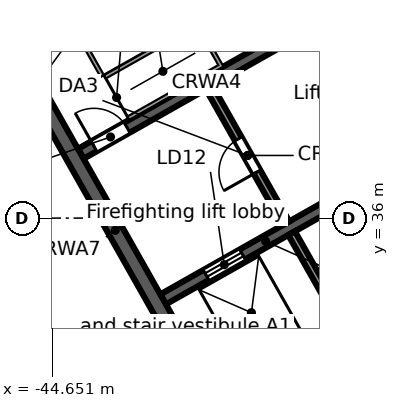
"""IFC4 building model, lengths in metres.
Left out: names, types, materials, properties, quantities, classifications, styles, units other than length and angle.
Written with IfcOpenShell. Run it as: python <this file> out.ifc"""

import sys

from ifc_helpers import new_model, si_unit, direction, frame, frame_2d, origin, place, context, subcontext, project, spatial, rectangle, extrude, element, fill, save


model = new_model("IFC4")
c1 = context("Model", 3, precision=1e-05, world=origin(), true_north=direction((0.0, 1.0)))
c2 = subcontext(c1, "Body", "Model", "MODEL_VIEW")
j1 = project(units=[si_unit("LENGTHUNIT", "METRE"), si_unit("PLANEANGLEUNIT", "RADIAN")], contexts=[c1])
p1 = place(None, origin())
s1 = spatial("IfcSite", under=j1, at=p1, CompositionType="ELEMENT")
p2 = place(p1, origin())
s2 = spatial("IfcBuilding", under=s1, at=p2, CompositionType="ELEMENT")
p3 = place(p2, frame((0.0, 0.0, 262.7)))
s3 = spatial("IfcBuildingStorey", under=s2, at=p3, CompositionType="ELEMENT", Elevation=262.7)
p4 = place(p3, frame((-58.732, 38.771, 0.0), z_axis=(0.0, 0.0, 1.0), x_axis=(0.870355615581, 0.492423702137, 0.0)))
e1 = element("IfcWall", 1, at=p4, inside=s3, PredefinedType="STANDARD", context=c2, shape_type="SweptSolid", body=[
    extrude(rectangle(XDim=64.052, YDim=0.25, at=frame_2d((32.026, 0.0))), origin(), (0.0, 0.0, 1.0), 3.52),
])
p5 = place(p4, frame((61.259, 0.0, 0.8)))
e2 = element("IfcOpeningElement", 2, at=p5, cuts=e1, PredefinedType="OPENING", context=c2, shape_type="SweptSolid", body=[
    extrude(rectangle(XDim=2.4, YDim=2.2, at=frame_2d((1.2, 1.1))), frame((0.0, 0.135, 0.0), z_axis=(0.0, -1.0, 0.0), x_axis=(1.0, 0.0, 0.0)), (0.0, 0.0, 1.0), 0.27),
])
p6 = place(p4, frame((58.216, 0.0, 0.8)))
e3 = element("IfcOpeningElement", 3, at=p6, cuts=e1, PredefinedType="OPENING", context=c2, shape_type="SweptSolid", body=[
    extrude(rectangle(XDim=2.4, YDim=2.2, at=frame_2d((1.2, 1.1))), frame((0.0, 0.135, 0.0), z_axis=(0.0, -1.0, 0.0), x_axis=(1.0, 0.0, 0.0)), (0.0, 0.0, 1.0), 0.27),
])
p7 = place(p4, frame((55.173, 0.0, 0.8)))
e4 = element("IfcOpeningElement", 4, at=p7, cuts=e1, PredefinedType="OPENING", context=c2, shape_type="SweptSolid", body=[
    extrude(rectangle(XDim=2.4, YDim=2.2, at=frame_2d((1.2, 1.1))), frame((0.0, 0.135, 0.0), z_axis=(0.0, -1.0, 0.0), x_axis=(1.0, 0.0, 0.0)), (0.0, 0.0, 1.0), 0.27),
])
p8 = place(p4, frame((52.129, 0.0, 0.8)))
e5 = element("IfcOpeningElement", 5, at=p8, cuts=e1, PredefinedType="OPENING", context=c2, shape_type="SweptSolid", body=[
    extrude(rectangle(XDim=2.4, YDim=2.2, at=frame_2d((1.2, 1.1))), frame((0.0, 0.135, 0.0), z_axis=(0.0, -1.0, 0.0), x_axis=(1.0, 0.0, 0.0)), (0.0, 0.0, 1.0), 0.27),
])
p9 = place(p4, frame((49.086, 0.0, 0.8)))
e6 = element("IfcOpeningElement", 6, at=p9, cuts=e1, PredefinedType="OPENING", context=c2, shape_type="SweptSolid", body=[
    extrude(rectangle(XDim=2.4, YDim=2.2, at=frame_2d((1.2, 1.1))), frame((0.0, 0.135, 0.0), z_axis=(0.0, -1.0, 0.0), x_axis=(1.0, 0.0, 0.0)), (0.0, 0.0, 1.0), 0.27),
])
p10 = place(p4, frame((46.043, 0.0, 0.8)))
e7 = element("IfcOpeningElement", 7, at=p10, cuts=e1, PredefinedType="OPENING", context=c2, shape_type="SweptSolid", body=[
    extrude(rectangle(XDim=2.4, YDim=2.2, at=frame_2d((1.2, 1.1))), frame((0.0, 0.135, 0.0), z_axis=(0.0, -1.0, 0.0), x_axis=(1.0, 0.0, 0.0)), (0.0, 0.0, 1.0), 0.27),
])
p11 = place(p4, frame((43.0, 0.0, 0.8)))
e8 = element("IfcOpeningElement", 8, at=p11, cuts=e1, PredefinedType="OPENING", context=c2, shape_type="SweptSolid", body=[
    extrude(rectangle(XDim=2.4, YDim=2.2, at=frame_2d((1.2, 1.1))), frame((0.0, 0.135, 0.0), z_axis=(0.0, -1.0, 0.0), x_axis=(1.0, 0.0, 0.0)), (0.0, 0.0, 1.0), 0.27),
])
p12 = place(p4, frame((39.956, 0.0, 0.8)))
e9 = element("IfcOpeningElement", 9, at=p12, cuts=e1, PredefinedType="OPENING", context=c2, shape_type="SweptSolid", body=[
    extrude(rectangle(XDim=2.4, YDim=2.2, at=frame_2d((1.2, 1.1))), frame((0.0, 0.135, 0.0), z_axis=(0.0, -1.0, 0.0), x_axis=(1.0, 0.0, 0.0)), (0.0, 0.0, 1.0), 0.27),
])
p13 = place(p4, frame((36.913, 0.0, 0.8)))
e10 = element("IfcOpeningElement", 10, at=p13, cuts=e1, PredefinedType="OPENING", context=c2, shape_type="SweptSolid", body=[
    extrude(rectangle(XDim=2.4, YDim=2.2, at=frame_2d((1.2, 1.1))), frame((0.0, 0.135, 0.0), z_axis=(0.0, -1.0, 0.0), x_axis=(1.0, 0.0, 0.0)), (0.0, 0.0, 1.0), 0.27),
])
p14 = place(p4, frame((33.87, 0.0, 0.8)))
e11 = element("IfcOpeningElement", 11, at=p14, cuts=e1, PredefinedType="OPENING", context=c2, shape_type="SweptSolid", body=[
    extrude(rectangle(XDim=2.4, YDim=2.2, at=frame_2d((1.2, 1.1))), frame((0.0, 0.135, 0.0), z_axis=(0.0, -1.0, 0.0), x_axis=(1.0, 0.0, 0.0)), (0.0, 0.0, 1.0), 0.27),
])
p15 = place(p4, frame((30.826, 0.0, 0.8)))
e12 = element("IfcOpeningElement", 12, at=p15, cuts=e1, PredefinedType="OPENING", context=c2, shape_type="SweptSolid", body=[
    extrude(rectangle(XDim=2.4, YDim=2.2, at=frame_2d((1.2, 1.1))), frame((0.0, 0.135, 0.0), z_axis=(0.0, -1.0, 0.0), x_axis=(1.0, 0.0, 0.0)), (0.0, 0.0, 1.0), 0.27),
])
p16 = place(p4, frame((27.783, 0.0, 0.8)))
e13 = element("IfcOpeningElement", 13, at=p16, cuts=e1, PredefinedType="OPENING", context=c2, shape_type="SweptSolid", body=[
    extrude(rectangle(XDim=2.4, YDim=2.2, at=frame_2d((1.2, 1.1))), frame((0.0, 0.135, 0.0), z_axis=(0.0, -1.0, 0.0), x_axis=(1.0, 0.0, 0.0)), (0.0, 0.0, 1.0), 0.27),
])
p17 = place(p4, frame((24.74, 0.0, 0.8)))
e14 = element("IfcOpeningElement", 14, at=p17, cuts=e1, PredefinedType="OPENING", context=c2, shape_type="SweptSolid", body=[
    extrude(rectangle(XDim=2.4, YDim=2.2, at=frame_2d((1.2, 1.1))), frame((0.0, 0.135, 0.0), z_axis=(0.0, -1.0, 0.0), x_axis=(1.0, 0.0, 0.0)), (0.0, 0.0, 1.0), 0.27),
])
p18 = place(p4, frame((21.696, 0.0, 0.8)))
e15 = element("IfcOpeningElement", 15, at=p18, cuts=e1, PredefinedType="OPENING", context=c2, shape_type="SweptSolid", body=[
    extrude(rectangle(XDim=2.4, YDim=2.2, at=frame_2d((1.2, 1.1))), frame((0.0, 0.135, 0.0), z_axis=(0.0, -1.0, 0.0), x_axis=(1.0, 0.0, 0.0)), (0.0, 0.0, 1.0), 0.27),
])
p19 = place(p4, frame((18.653, 0.0, 0.8)))
e16 = element("IfcOpeningElement", 16, at=p19, cuts=e1, PredefinedType="OPENING", context=c2, shape_type="SweptSolid", body=[
    extrude(rectangle(XDim=2.4, YDim=2.2, at=frame_2d((1.2, 1.1))), frame((0.0, 0.135, 0.0), z_axis=(0.0, -1.0, 0.0), x_axis=(1.0, 0.0, 0.0)), (0.0, 0.0, 1.0), 0.27),
])
p20 = place(p4, frame((15.61, 0.0, 0.8)))
e17 = element("IfcOpeningElement", 17, at=p20, cuts=e1, PredefinedType="OPENING", context=c2, shape_type="SweptSolid", body=[
    extrude(rectangle(XDim=2.4, YDim=2.2, at=frame_2d((1.2, 1.1))), frame((0.0, 0.135, 0.0), z_axis=(0.0, -1.0, 0.0), x_axis=(1.0, 0.0, 0.0)), (0.0, 0.0, 1.0), 0.27),
])
p21 = place(p4, frame((12.567, 0.0, 0.8)))
e18 = element("IfcOpeningElement", 18, at=p21, cuts=e1, PredefinedType="OPENING", context=c2, shape_type="SweptSolid", body=[
    extrude(rectangle(XDim=2.4, YDim=2.2, at=frame_2d((1.2, 1.1))), frame((0.0, 0.135, 0.0), z_axis=(0.0, -1.0, 0.0), x_axis=(1.0, 0.0, 0.0)), (0.0, 0.0, 1.0), 0.27),
])
p22 = place(p4, frame((9.523, 0.0, 0.8)))
e19 = element("IfcOpeningElement", 19, at=p22, cuts=e1, PredefinedType="OPENING", context=c2, shape_type="SweptSolid", body=[
    extrude(rectangle(XDim=2.4, YDim=2.2, at=frame_2d((1.2, 1.1))), frame((0.0, 0.135, 0.0), z_axis=(0.0, -1.0, 0.0), x_axis=(1.0, 0.0, 0.0)), (0.0, 0.0, 1.0), 0.27),
])
p23 = place(p4, frame((6.48, 0.0, 0.8)))
e20 = element("IfcOpeningElement", 20, at=p23, cuts=e1, PredefinedType="OPENING", context=c2, shape_type="SweptSolid", body=[
    extrude(rectangle(XDim=2.4, YDim=2.2, at=frame_2d((1.2, 1.1))), frame((0.0, 0.135, 0.0), z_axis=(0.0, -1.0, 0.0), x_axis=(1.0, 0.0, 0.0)), (0.0, 0.0, 1.0), 0.27),
])
p24 = place(p4, frame((3.437, 0.0, 0.8)))
e21 = element("IfcOpeningElement", 21, at=p24, cuts=e1, PredefinedType="OPENING", context=c2, shape_type="SweptSolid", body=[
    extrude(rectangle(XDim=2.4, YDim=2.2, at=frame_2d((1.2, 1.1))), frame((0.0, 0.135, 0.0), z_axis=(0.0, -1.0, 0.0), x_axis=(1.0, 0.0, 0.0)), (0.0, 0.0, 1.0), 0.27),
])
p25 = place(p4, frame((0.393, 0.0, 0.8)))
e22 = element("IfcOpeningElement", 22, at=p25, cuts=e1, PredefinedType="OPENING", context=c2, shape_type="SweptSolid", body=[
    extrude(rectangle(XDim=2.4, YDim=2.2, at=frame_2d((1.2, 1.1))), frame((0.0, 0.135, 0.0), z_axis=(0.0, -1.0, 0.0), x_axis=(1.0, 0.0, 0.0)), (0.0, 0.0, 1.0), 0.27),
])
p26 = place(p3, frame((-44.115, 26.507, 0.0), z_axis=(0.0, 0.0, 1.0), x_axis=(-0.857166583633, 0.515039268311, 0.0)))
e23 = element("IfcWall", 23, at=p26, inside=s3, PredefinedType="STANDARD", context=c2, shape_type="SweptSolid", body=[
    extrude(rectangle(XDim=17.106, YDim=0.25, at=frame_2d((8.553, 0.0))), origin(), (0.0, 0.0, 1.0), 3.52),
])
p27 = place(p26, frame((14.417, 0.0, 0.8)))
e24 = element("IfcOpeningElement", 24, at=p27, cuts=e23, PredefinedType="OPENING", context=c2, shape_type="SweptSolid", body=[
    extrude(rectangle(XDim=2.4, YDim=2.2, at=frame_2d((1.2, 1.1))), frame((0.0, 0.135, 0.0), z_axis=(0.0, -1.0, 0.0), x_axis=(1.0, 0.0, 0.0)), (0.0, 0.0, 1.0), 0.27),
])
p28 = place(p26, frame((11.584, 0.0, 0.8)))
e25 = element("IfcOpeningElement", 25, at=p28, cuts=e23, PredefinedType="OPENING", context=c2, shape_type="SweptSolid", body=[
    extrude(rectangle(XDim=2.4, YDim=2.2, at=frame_2d((1.2, 1.1))), frame((0.0, 0.135, 0.0), z_axis=(0.0, -1.0, 0.0), x_axis=(1.0, 0.0, 0.0)), (0.0, 0.0, 1.0), 0.27),
])
p29 = place(p26, frame((8.75, 0.0, 0.8)))
e26 = element("IfcOpeningElement", 26, at=p29, cuts=e23, PredefinedType="OPENING", context=c2, shape_type="SweptSolid", body=[
    extrude(rectangle(XDim=2.4, YDim=2.2, at=frame_2d((1.2, 1.1))), frame((0.0, 0.135, 0.0), z_axis=(0.0, -1.0, 0.0), x_axis=(1.0, 0.0, 0.0)), (0.0, 0.0, 1.0), 0.27),
])
p30 = place(p26, frame((5.917, 0.0, 0.8)))
e27 = element("IfcOpeningElement", 27, at=p30, cuts=e23, PredefinedType="OPENING", context=c2, shape_type="SweptSolid", body=[
    extrude(rectangle(XDim=2.4, YDim=2.2, at=frame_2d((1.2, 1.1))), frame((0.0, 0.135, 0.0), z_axis=(0.0, -1.0, 0.0), x_axis=(1.0, 0.0, 0.0)), (0.0, 0.0, 1.0), 0.27),
])
p31 = place(p26, frame((3.084, 0.0, 0.8)))
e28 = element("IfcOpeningElement", 28, at=p31, cuts=e23, PredefinedType="OPENING", context=c2, shape_type="SweptSolid", body=[
    extrude(rectangle(XDim=2.4, YDim=2.2, at=frame_2d((1.2, 1.1))), frame((0.0, 0.135, 0.0), z_axis=(0.0, -1.0, 0.0), x_axis=(1.0, 0.0, 0.0)), (0.0, 0.0, 1.0), 0.27),
])
p32 = place(p26, frame((0.25, 0.0, 0.8)))
e29 = element("IfcOpeningElement", 29, at=p32, cuts=e23, PredefinedType="OPENING", context=c2, shape_type="SweptSolid", body=[
    extrude(rectangle(XDim=2.4, YDim=2.2, at=frame_2d((1.2, 1.1))), frame((0.0, 0.135, 0.0), z_axis=(0.0, -1.0, 0.0), x_axis=(1.0, 0.0, 0.0)), (0.0, 0.0, 1.0), 0.27),
])
p33 = place(p3, frame((-3.017, 46.293, 0.0), z_axis=(0.0, 0.0, 1.0), x_axis=(-0.870355474887, -0.492423950812, 0.0)))
e30 = element("IfcWall", 30, at=p33, inside=s3, PredefinedType="STANDARD", context=c2, shape_type="SweptSolid", body=[
    extrude(rectangle(XDim=40.34, YDim=0.25, at=frame_2d((20.17, 0.0))), origin(), (0.0, 0.0, 1.0), 3.52),
])
p34 = place(p33, frame((37.428, 0.0, 0.8)))
e31 = element("IfcOpeningElement", 31, at=p34, cuts=e30, PredefinedType="OPENING", context=c2, shape_type="SweptSolid", body=[
    extrude(rectangle(XDim=2.4, YDim=2.2, at=frame_2d((1.2, 1.1))), frame((0.0, 0.135, 0.0), z_axis=(0.0, -1.0, 0.0), x_axis=(1.0, 0.0, 0.0)), (0.0, 0.0, 1.0), 0.27),
])
p35 = place(p33, frame((34.372, 0.0, 0.0)))
e32 = element("IfcOpeningElement", 32, at=p35, cuts=e30, PredefinedType="OPENING", context=c2, shape_type="SweptSolid", body=[
    extrude(rectangle(XDim=1.8, YDim=2.4, at=frame_2d((0.9, 1.2))), frame((0.0, 0.135, 0.0), z_axis=(0.0, -1.0, 0.0), x_axis=(1.0, 0.0, 0.0)), (0.0, 0.0, 1.0), 0.27),
])
p36 = place(p33, frame((30.716, 0.0, 0.8)))
e33 = element("IfcOpeningElement", 33, at=p36, cuts=e30, PredefinedType="OPENING", context=c2, shape_type="SweptSolid", body=[
    extrude(rectangle(XDim=2.4, YDim=2.2, at=frame_2d((1.2, 1.1))), frame((0.0, 0.135, 0.0), z_axis=(0.0, -1.0, 0.0), x_axis=(1.0, 0.0, 0.0)), (0.0, 0.0, 1.0), 0.27),
])
p37 = place(p33, frame((27.36, 0.0, 0.8)))
e34 = element("IfcOpeningElement", 34, at=p37, cuts=e30, PredefinedType="OPENING", context=c2, shape_type="SweptSolid", body=[
    extrude(rectangle(XDim=2.4, YDim=2.2, at=frame_2d((1.2, 1.1))), frame((0.0, 0.135, 0.0), z_axis=(0.0, -1.0, 0.0), x_axis=(1.0, 0.0, 0.0)), (0.0, 0.0, 1.0), 0.27),
])
p38 = place(p33, frame((24.304, 0.0, 0.0)))
e35 = element("IfcOpeningElement", 35, at=p38, cuts=e30, PredefinedType="OPENING", context=c2, shape_type="SweptSolid", body=[
    extrude(rectangle(XDim=1.8, YDim=2.4, at=frame_2d((0.9, 1.2))), frame((0.0, 0.135, 0.0), z_axis=(0.0, -1.0, 0.0), x_axis=(1.0, 0.0, 0.0)), (0.0, 0.0, 1.0), 0.27),
])
p39 = place(p33, frame((20.648, 0.0, 0.8)))
e36 = element("IfcOpeningElement", 36, at=p39, cuts=e30, PredefinedType="OPENING", context=c2, shape_type="SweptSolid", body=[
    extrude(rectangle(XDim=2.4, YDim=2.2, at=frame_2d((1.2, 1.1))), frame((0.0, 0.135, 0.0), z_axis=(0.0, -1.0, 0.0), x_axis=(1.0, 0.0, 0.0)), (0.0, 0.0, 1.0), 0.27),
])
p40 = place(p33, frame((17.292, 0.0, 0.8)))
e37 = element("IfcOpeningElement", 37, at=p40, cuts=e30, PredefinedType="OPENING", context=c2, shape_type="SweptSolid", body=[
    extrude(rectangle(XDim=2.4, YDim=2.2, at=frame_2d((1.2, 1.1))), frame((0.0, 0.135, 0.0), z_axis=(0.0, -1.0, 0.0), x_axis=(1.0, 0.0, 0.0)), (0.0, 0.0, 1.0), 0.27),
])
p41 = place(p33, frame((14.236, 0.0, 0.0)))
e38 = element("IfcOpeningElement", 38, at=p41, cuts=e30, PredefinedType="OPENING", context=c2, shape_type="SweptSolid", body=[
    extrude(rectangle(XDim=1.8, YDim=2.4, at=frame_2d((0.9, 1.2))), frame((0.0, 0.135, 0.0), z_axis=(0.0, -1.0, 0.0), x_axis=(1.0, 0.0, 0.0)), (0.0, 0.0, 1.0), 0.27),
])
p42 = place(p33, frame((10.58, 0.0, 0.8)))
e39 = element("IfcOpeningElement", 39, at=p42, cuts=e30, PredefinedType="OPENING", context=c2, shape_type="SweptSolid", body=[
    extrude(rectangle(XDim=2.4, YDim=2.2, at=frame_2d((1.2, 1.1))), frame((0.0, 0.135, 0.0), z_axis=(0.0, -1.0, 0.0), x_axis=(1.0, 0.0, 0.0)), (0.0, 0.0, 1.0), 0.27),
])
p43 = place(p33, frame((7.224, 0.0, 0.8)))
e40 = element("IfcOpeningElement", 40, at=p43, cuts=e30, PredefinedType="OPENING", context=c2, shape_type="SweptSolid", body=[
    extrude(rectangle(XDim=2.4, YDim=2.2, at=frame_2d((1.2, 1.1))), frame((0.0, 0.135, 0.0), z_axis=(0.0, -1.0, 0.0), x_axis=(1.0, 0.0, 0.0)), (0.0, 0.0, 1.0), 0.27),
])
p44 = place(p33, frame((4.168, 0.0, 0.0)))
e41 = element("IfcOpeningElement", 41, at=p44, cuts=e30, PredefinedType="OPENING", context=c2, shape_type="SweptSolid", body=[
    extrude(rectangle(XDim=1.8, YDim=2.4, at=frame_2d((0.9, 1.2))), frame((0.0, 0.135, 0.0), z_axis=(0.0, -1.0, 0.0), x_axis=(1.0, 0.0, 0.0)), (0.0, 0.0, 1.0), 0.27),
])
p45 = place(p33, frame((0.512, 0.0, 0.8)))
e42 = element("IfcOpeningElement", 42, at=p45, cuts=e30, PredefinedType="OPENING", context=c2, shape_type="SweptSolid", body=[
    extrude(rectangle(XDim=2.4, YDim=2.2, at=frame_2d((1.2, 1.1))), frame((0.0, 0.135, 0.0), z_axis=(0.0, -1.0, 0.0), x_axis=(1.0, 0.0, 0.0)), (0.0, 0.0, 1.0), 0.27),
])
p46 = place(p3, frame((-39.813, 29.662, 0.0), z_axis=(0.0, 0.0, 1.0), x_axis=(0.870350116061, 0.492433422375, 0.0)))
e43 = element("IfcWall", 43, at=p46, inside=s3, PredefinedType="SOLIDWALL", context=c2, shape_type="SweptSolid", body=[
    extrude(rectangle(XDim=17.0, YDim=0.4, at=frame_2d((8.5, 0.0))), origin(), (0.0, 0.0, 1.0), 3.52),
])
p47 = place(p46, frame((7.2, 0.0, 0.0)))
e44 = element("IfcOpeningElement", 44, at=p47, cuts=e43, PredefinedType="OPENING", context=c2, shape_type="SweptSolid", body=[
    extrude(rectangle(XDim=1.2, YDim=2.1, at=frame_2d((0.6, 1.05))), frame((0.0, 0.21, 0.0), z_axis=(0.0, -1.0, 0.0), x_axis=(1.0, 0.0, 0.0)), (0.0, 0.0, 1.0), 0.42),
])
p48 = place(p3, frame((-41.73, 33.863, 0.0), z_axis=(0.0, 0.0, 1.0), x_axis=(0.870350800578, 0.492432212525, 0.0)))
e45 = element("IfcWall", 45, at=p48, inside=s3, PredefinedType="SOLIDWALL", context=c2, shape_type="SweptSolid", body=[
    extrude(rectangle(XDim=6.2, YDim=0.3, at=frame_2d((3.1, 0.0))), origin(), (0.0, 0.0, 1.0), 3.52),
])
p49 = place(p48, frame((1.3, 0.0, 0.0)))
e46 = element("IfcOpeningElement", 46, at=p49, cuts=e45, PredefinedType="OPENING", context=c2, shape_type="SweptSolid", body=[
    extrude(rectangle(XDim=1.1, YDim=2.1, at=frame_2d((0.55, 1.05))), frame((0.0, 0.16, 0.0), z_axis=(0.0, -1.0, 0.0), x_axis=(1.0, 0.0, 0.0)), (0.0, 0.0, 1.0), 0.32),
])
p50 = place(p3, frame((-43.897, 37.692, 0.0), z_axis=(0.0, 0.0, 1.0), x_axis=(0.870356351998, 0.492422400523, 0.0)))
e47 = element("IfcWall", 47, at=p50, inside=s3, PredefinedType="SOLIDWALL", context=c2, shape_type="SweptSolid", body=[
    extrude(rectangle(XDim=7.6, YDim=0.3, at=frame_2d((3.8, 0.0))), origin(), (0.0, 0.0, 1.0), 3.52),
])
p51 = place(p50, frame((0.4, 0.0, 0.0)))
e48 = element("IfcOpeningElement", 48, at=p51, cuts=e47, PredefinedType="OPENING", context=c2, shape_type="SweptSolid", body=[
    extrude(rectangle(XDim=1.0, YDim=2.1, at=frame_2d((0.5, 1.05))), frame((0.0, 0.16, 0.0), z_axis=(0.0, -1.0, 0.0), x_axis=(1.0, 0.0, 0.0)), (0.0, 0.0, 1.0), 0.32),
])
p52 = place(p3, frame((-46.238, 41.423, 0.0), z_axis=(0.0, 0.0, 1.0), x_axis=(0.492421663121, -0.870356769198, 0.0)))
e49 = element("IfcWall", 49, at=p52, inside=s3, PredefinedType="SOLIDWALL", context=c2, shape_type="SweptSolid", body=[
    extrude(rectangle(XDim=13.2, YDim=0.4, at=frame_2d((6.6, 0.0))), origin(), (0.0, 0.0, 1.0), 3.52),
])
p53 = place(p3, frame((-38.349, 35.603, 0.0), z_axis=(0.0, 0.0, 1.0), x_axis=(0.492397924348, -0.870370199454, 0.0)))
e50 = element("IfcWall", 50, at=p53, inside=s3, PredefinedType="SOLIDWALL", context=c2, shape_type="SweptSolid", body=[
    extrude(rectangle(XDim=4.25, YDim=0.2, at=frame_2d((2.125, 0.0))), origin(), (0.0, 0.0, 1.0), 3.52),
])
p54 = place(p3, frame((-40.516, 39.433, 0.0), z_axis=(0.0, 0.0, 1.0), x_axis=(0.492453559952, -0.87033872216, 0.0)))
e51 = element("IfcWall", 51, at=p54, inside=s3, PredefinedType="PARTITIONING", context=c2, shape_type="SweptSolid", body=[
    extrude(rectangle(XDim=4.1, YDim=0.2, at=frame_2d((2.05, 0.0))), origin(), (0.0, 0.0, 1.0), 3.52),
])
p55 = place(p54, frame((1.55, 0.0, 0.0)))
e52 = element("IfcOpeningElement", 52, at=p55, cuts=e51, PredefinedType="OPENING", context=c2, shape_type="SweptSolid", body=[
    extrude(rectangle(XDim=1.0, YDim=2.1, at=frame_2d((0.5, 1.05))), frame((0.0, 0.11, 0.0), z_axis=(0.0, -1.0, 0.0), x_axis=(1.0, 0.0, 0.0)), (0.0, 0.0, 1.0), 0.22),
])
p56 = place(p49, origin())
e53 = element("IfcDoor", 53, at=p56, inside=s3, OperationType="DOUBLE_DOOR_SLIDING", PredefinedType="DOOR", context=c2, shape_type="SweptSolid", body=[
    extrude(rectangle(XDim=1.1, YDim=2.1, at=frame_2d((0.55, 1.05))), frame((0.0, 0.025, 0.0), z_axis=(0.0, -1.0, 0.0), x_axis=(1.0, 0.0, 0.0)), (0.0, 0.0, 1.0), 0.05),
])
fill(e46, e53)
p57 = place(p51, origin())
e54 = element("IfcDoor", 54, at=p57, inside=s3, OperationType="SINGLE_SWING_LEFT", PredefinedType="DOOR", context=c2, shape_type="SweptSolid", body=[
    extrude(rectangle(XDim=1.0, YDim=2.1, at=frame_2d((0.5, 1.05))), frame((0.0, 0.025, 0.0), z_axis=(0.0, -1.0, 0.0), x_axis=(1.0, 0.0, 0.0)), (0.0, 0.0, 1.0), 0.05),
])
fill(e48, e54)
p58 = place(p55, frame((1.0, 0.0, 0.0), z_axis=(0.0, 0.0, 1.0), x_axis=(-1.0, 0.0, 0.0)))
e55 = element("IfcDoor", 55, at=p58, inside=s3, OperationType="SINGLE_SWING_LEFT", PredefinedType="DOOR", context=c2, shape_type="SweptSolid", body=[
    extrude(rectangle(XDim=1.0, YDim=2.1, at=frame_2d((0.5, 1.05))), frame((0.0, 0.025, 0.0), z_axis=(0.0, -1.0, 0.0), x_axis=(1.0, 0.0, 0.0)), (0.0, 0.0, 1.0), 0.05),
])
fill(e52, e55)
save(model, sys.argv[1])
